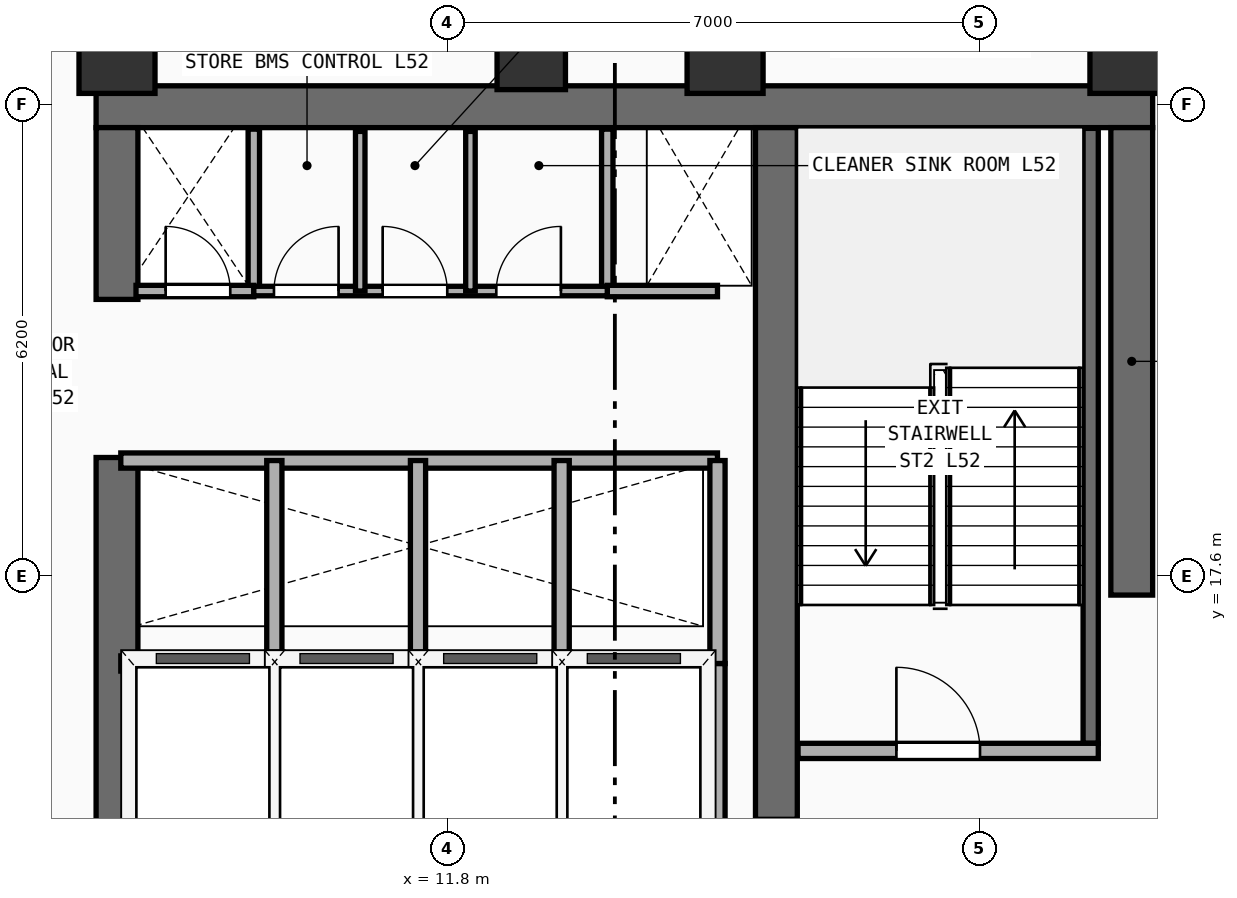
"""IFC4 building model, lengths in metres.
Left out: names, types, materials, properties, quantities, classifications, styles, units other than length and angle.
Written with IfcOpenShell. Run it as: python <this file> out.ifc"""

import sys

from ifc_helpers import new_model, si_unit, direction, frame, frame_2d, origin, origin_2d, place, context, subcontext, project, spatial, rectangle, extrude, element, fill, save


model = new_model("IFC4")
c1 = context("Model", 3, precision=1e-05, world=origin(), true_north=direction((0.0, 1.0)))
c2 = subcontext(c1, "Body", "Model", "MODEL_VIEW")
j1 = project(units=[si_unit("LENGTHUNIT", "METRE"), si_unit("PLANEANGLEUNIT", "RADIAN")], contexts=[c1])
p1 = place(None, origin())
s1 = spatial("IfcSite", under=j1, at=p1, CompositionType="ELEMENT")
p2 = place(p1, origin())
s2 = spatial("IfcBuilding", under=s1, at=p2, CompositionType="ELEMENT")
p3 = place(p2, frame((0.0, 0.0, 204.5)))
s3 = spatial("IfcBuildingStorey", under=s2, at=p3, CompositionType="ELEMENT", Elevation=204.5)
p4 = place(p3, frame((7.175, 23.775, 0.0), z_axis=(0.0, 0.0, 1.0), x_axis=(1.0, 0.0, 0.0)))
e1 = element("IfcWall", 1, at=p4, inside=s3, PredefinedType="SHEAR", context=c2, shape_type="SweptSolid", body=[
    extrude(rectangle(XDim=13.9, YDim=0.55, at=frame_2d((6.95, 0.0))), origin(), (0.0, 0.0, 1.0), 3.56),
])
p5 = place(p3, frame((7.45, 14.35, 0.0), z_axis=(0.0, 0.0, 1.0), x_axis=(0.0, 1.0, 0.0)))
e2 = element("IfcWall", 2, at=p5, inside=s3, PredefinedType="SHEAR", context=c2, shape_type="SweptSolid", body=[
    extrude(rectangle(XDim=4.81, YDim=0.55, at=frame_2d((2.405, 0.0))), origin(), (0.0, 0.0, 1.0), 3.56),
])
p6 = place(p3, frame((7.45, 21.24, 0.0), z_axis=(0.0, 0.0, 1.0), x_axis=(0.0, 1.0, 0.0)))
e3 = element("IfcWall", 3, at=p6, inside=s3, PredefinedType="SHEAR", context=c2, shape_type="SweptSolid", body=[
    extrude(rectangle(XDim=2.26, YDim=0.55, at=frame_2d((1.13, 0.0))), origin(), (0.0, 0.0, 1.0), 3.56),
])
p7 = place(p3, frame((20.8, 17.35, 0.0), z_axis=(0.0, 0.0, 1.0), x_axis=(0.0, 1.0, 0.0)))
e4 = element("IfcWall", 4, at=p7, inside=s3, PredefinedType="SHEAR", context=c2, shape_type="SweptSolid", body=[
    extrude(rectangle(XDim=6.15, YDim=0.55, at=frame_2d((3.075, 0.0))), origin(), (0.0, 0.0, 1.0), 3.56),
])
p8 = place(p3, frame((16.125, 14.4, 0.0), z_axis=(0.0, 0.0, 1.0), x_axis=(0.0, 1.0, 0.0)))
e5 = element("IfcWall", 5, at=p8, inside=s3, PredefinedType="SHEAR", context=c2, shape_type="SweptSolid", body=[
    extrude(rectangle(XDim=9.1, YDim=0.55, at=frame_2d((4.55, 0.0))), origin(), (0.0, 0.0, 1.0), 3.56),
])
for number, where, z_axis, x_axis in (
    (6, (7.45, 24.45, 0.0), (0.0, 0.0, 1.0), (1.0, 0.0, 0.0)),
    (7, (15.45, 24.45, 0.0), (0.0, 0.0, 1.0), (1.0, 0.0, 0.0)),
    (8, (20.75, 24.45, 0.0), (0.0, 0.0, 1.0), (1.0, 0.0, 0.0)),
):
    element("IfcColumn", number, at=place(p3, frame(where, z_axis=z_axis, x_axis=x_axis)), inside=s3, PredefinedType="COLUMN", context=c2, shape_type="SweptSolid", body=[
        extrude(rectangle(XDim=1.0, YDim=1.0, at=origin_2d()), origin(), (0.0, 0.0, 1.0), 3.56),
    ])
p9 = place(p3, frame((12.9, 24.45, 0.0), z_axis=(0.0, 0.0, 1.0), x_axis=(1.0, 0.0, 0.0)))
e9 = element("IfcColumn", 9, at=p9, inside=s3, PredefinedType="COLUMN", context=c2, shape_type="SweptSolid", body=[
    extrude(rectangle(XDim=0.9, YDim=0.9, at=origin_2d()), origin(), (0.0, 0.0, 1.0), 3.56),
])
p10 = place(p3, frame((27.685, 19.775, 0.0), z_axis=(0.0, 0.0, 1.0), x_axis=(-0.707106781187, 0.707106781187, 0.0)))
e10 = element("IfcWall", 10, at=p10, inside=s3, PredefinedType="SOLIDWALL", context=c2, shape_type="SweptSolid", body=[
    extrude(rectangle(XDim=9.207, YDim=0.28, at=frame_2d((4.603, 0.0))), origin(), (0.0, 0.0, 1.0), 3.56),
])
p11 = place(p3, frame((20.26, 15.4, 0.0), z_axis=(0.0, 0.0, 1.0), x_axis=(0.0, 1.0, 0.0)))
e11 = element("IfcWall", 11, at=p11, inside=s3, PredefinedType="SHEAR", context=c2, shape_type="SweptSolid", body=[
    extrude(rectangle(XDim=8.09, YDim=0.2, at=frame_2d((4.045, 0.0))), origin(), (0.0, 0.0, 1.0), 3.56),
])
p12 = place(p3, frame((16.41, 15.3, 0.0), z_axis=(0.0, 0.0, 1.0), x_axis=(1.0, 0.0, 0.0)))
e12 = element("IfcWall", 12, at=p12, inside=s3, PredefinedType="PARTITIONING", context=c2, shape_type="SweptSolid", body=[
    extrude(rectangle(XDim=3.95, YDim=0.2, at=frame_2d((1.975, 0.0))), origin(), (0.0, 0.0, 1.0), 3.56),
])
p13 = place(p12, frame((1.294, 0.0, 0.0)))
e13 = element("IfcOpeningElement", 13, at=p13, cuts=e12, PredefinedType="OPENING", context=c2, shape_type="SweptSolid", body=[
    extrude(rectangle(XDim=1.1, YDim=2.2, at=frame_2d((0.55, 1.1))), frame((0.0, 0.11, 0.0), z_axis=(0.0, -1.0, 0.0), x_axis=(1.0, 0.0, 0.0)), (0.0, 0.0, 1.0), 0.22),
])
p14 = place(p3, frame((7.5, 16.45, 0.0), z_axis=(0.0, 0.0, 1.0), x_axis=(1.0, 0.0, 0.0)))
e14 = element("IfcWall", 14, at=p14, inside=s3, PredefinedType="PARTITIONING", context=c2, shape_type="SweptSolid", body=[
    extrude(rectangle(XDim=7.85, YDim=0.2, at=frame_2d((3.925, 0.0))), origin(), (0.0, 0.0, 1.0), 3.56),
])
for number, where, z_axis, x_axis in (
    (15, (15.35, 14.22, 0.0), (0.0, 0.0, 1.0), (0.0, 1.0, 0.0)),
    (16, (9.52, 14.22, 0.0), (0.0, 0.0, 1.0), (0.0, 1.0, 0.0)),
    (17, (11.41, 14.22, 0.0), (0.0, 0.0, 1.0), (0.0, 1.0, 0.0)),
    (18, (13.3, 14.22, 0.0), (0.0, 0.0, 1.0), (0.0, 1.0, 0.0)),
):
    element("IfcWall", number, at=place(p3, frame(where, z_axis=z_axis, x_axis=x_axis)), inside=s3, PredefinedType="PARTITIONING", context=c2, shape_type="SweptSolid", body=[
        extrude(rectangle(XDim=2.23, YDim=0.2, at=frame_2d((1.115, 0.0))), origin(), (0.0, 0.0, 1.0), 3.56),
    ])
p15 = place(p3, frame((7.5, 19.12, 0.0), z_axis=(0.0, 0.0, 1.0), x_axis=(1.0, 0.0, 0.0)))
e19 = element("IfcWall", 19, at=p15, inside=s3, PredefinedType="PARTITIONING", context=c2, shape_type="SweptSolid", body=[
    extrude(rectangle(XDim=7.85, YDim=0.2, at=frame_2d((3.925, 0.0))), origin(), (0.0, 0.0, 1.0), 3.56),
])
for number, where, z_axis, x_axis in (
    (20, (15.35, 16.45, 0.0), (0.0, 0.0, 1.0), (0.0, 1.0, 0.0)),
    (21, (9.52, 16.45, 0.0), (0.0, 0.0, 1.0), (0.0, 1.0, 0.0)),
    (22, (11.41, 16.45, 0.0), (0.0, 0.0, 1.0), (0.0, 1.0, 0.0)),
    (23, (13.3, 16.45, 0.0), (0.0, 0.0, 1.0), (0.0, 1.0, 0.0)),
):
    element("IfcWall", number, at=place(p3, frame(where, z_axis=z_axis, x_axis=x_axis)), inside=s3, PredefinedType="PARTITIONING", context=c2, shape_type="SweptSolid", body=[
        extrude(rectangle(XDim=2.67, YDim=0.2, at=frame_2d((1.335, 0.0))), origin(), (0.0, 0.0, 1.0), 3.56),
    ])
for number, where, z_axis, x_axis in (
    (24, (9.25, 21.35, 0.0), (0.0, 0.0, 1.0), (0.0, 1.0, 0.0)),
    (25, (13.9, 21.35, 0.0), (0.0, 0.0, 1.0), (0.0, 1.0, 0.0)),
):
    element("IfcWall", number, at=place(p3, frame(where, z_axis=z_axis, x_axis=x_axis)), inside=s3, PredefinedType="PARTITIONING", context=c2, shape_type="SweptSolid", body=[
        extrude(rectangle(XDim=2.13, YDim=0.15, at=frame_2d((1.065, 0.0))), origin(), (0.0, 0.0, 1.0), 3.56),
    ])
p16 = place(p3, frame((7.7, 21.35, 0.0), z_axis=(0.0, 0.0, 1.0), x_axis=(1.0, 0.0, 0.0)))
e26 = element("IfcWall", 26, at=p16, inside=s3, PredefinedType="PARTITIONING", context=c2, shape_type="SweptSolid", body=[
    extrude(rectangle(XDim=1.55, YDim=0.15, at=frame_2d((0.775, 0.0))), origin(), (0.0, 0.0, 1.0), 3.56),
])
p17 = place(p16, frame((0.39, 0.0, 0.0)))
e27 = element("IfcOpeningElement", 27, at=p17, cuts=e26, PredefinedType="OPENING", context=c2, shape_type="SweptSolid", body=[
    extrude(rectangle(XDim=0.85, YDim=2.15, at=frame_2d((0.425, 1.075))), frame((0.0, 0.085, 0.0), z_axis=(0.0, -1.0, 0.0), x_axis=(1.0, 0.0, 0.0)), (0.0, 0.0, 1.0), 0.17),
])
p18 = place(p3, frame((13.9, 21.35, 0.0), z_axis=(0.0, 0.0, 1.0), x_axis=(1.0, 0.0, 0.0)))
e28 = element("IfcWall", 28, at=p18, inside=s3, PredefinedType="PARTITIONING", context=c2, shape_type="SweptSolid", body=[
    extrude(rectangle(XDim=1.45, YDim=0.15, at=frame_2d((0.725, 0.0))), origin(), (0.0, 0.0, 1.0), 3.56),
])
p19 = place(p3, frame((9.25, 21.35, 0.0), z_axis=(0.0, 0.0, 1.0), x_axis=(1.0, 0.0, 0.0)))
e29 = element("IfcWall", 29, at=p19, inside=s3, PredefinedType="PARTITIONING", context=c2, shape_type="SweptSolid", body=[
    extrude(rectangle(XDim=4.65, YDim=0.125, at=frame_2d((2.325, 0.0))), origin(), (0.0, 0.0, 1.0), 3.56),
])
p20 = place(p19, frame((0.265, 0.0, 0.0)))
e30 = element("IfcOpeningElement", 30, at=p20, cuts=e29, PredefinedType="OPENING", context=c2, shape_type="SweptSolid", body=[
    extrude(rectangle(XDim=0.85, YDim=2.15, at=frame_2d((0.425, 1.075))), frame((0.0, 0.073, 0.0), z_axis=(0.0, -1.0, 0.0), x_axis=(1.0, 0.0, 0.0)), (0.0, 0.0, 1.0), 0.145),
])
p21 = place(p19, frame((1.695, 0.0, 0.0)))
e31 = element("IfcOpeningElement", 31, at=p21, cuts=e29, PredefinedType="OPENING", context=c2, shape_type="SweptSolid", body=[
    extrude(rectangle(XDim=0.85, YDim=2.15, at=frame_2d((0.425, 1.075))), frame((0.0, 0.073, 0.0), z_axis=(0.0, -1.0, 0.0), x_axis=(1.0, 0.0, 0.0)), (0.0, 0.0, 1.0), 0.145),
])
p22 = place(p19, frame((3.19, 0.0, 0.0)))
e32 = element("IfcOpeningElement", 32, at=p22, cuts=e29, PredefinedType="OPENING", context=c2, shape_type="SweptSolid", body=[
    extrude(rectangle(XDim=0.85, YDim=2.15, at=frame_2d((0.425, 1.075))), frame((0.0, 0.073, 0.0), z_axis=(0.0, -1.0, 0.0), x_axis=(1.0, 0.0, 0.0)), (0.0, 0.0, 1.0), 0.145),
])
for number, where, z_axis, x_axis in (
    (33, (10.65, 21.35, 0.0), (0.0, 0.0, 1.0), (0.0, 1.0, 0.0)),
    (34, (12.1, 21.35, 0.0), (0.0, 0.0, 1.0), (0.0, 1.0, 0.0)),
):
    element("IfcWall", number, at=place(p3, frame(where, z_axis=z_axis, x_axis=x_axis)), inside=s3, PredefinedType="PARTITIONING", context=c2, shape_type="SweptSolid", body=[
        extrude(rectangle(XDim=2.1, YDim=0.125, at=frame_2d((1.05, 0.0))), origin(), (0.0, 0.0, 1.0), 3.56),
    ])
p23 = place(p13, origin())
e35 = element("IfcDoor", 35, at=p23, inside=s3, OperationType="SINGLE_SWING_LEFT", PredefinedType="DOOR", context=c2, shape_type="SweptSolid", body=[
    extrude(rectangle(XDim=1.1, YDim=2.2, at=frame_2d((0.55, 1.1))), frame((0.0, 0.025, 0.0), z_axis=(0.0, -1.0, 0.0), x_axis=(1.0, 0.0, 0.0)), (0.0, 0.0, 1.0), 0.05),
])
fill(e13, e35)
p24 = place(p17, origin())
e36 = element("IfcDoor", 36, at=p24, inside=s3, OperationType="SINGLE_SWING_LEFT", PredefinedType="DOOR", context=c2, shape_type="SweptSolid", body=[
    extrude(rectangle(XDim=0.85, YDim=2.15, at=frame_2d((0.425, 1.075))), frame((0.0, 0.025, 0.0), z_axis=(0.0, -1.0, 0.0), x_axis=(1.0, 0.0, 0.0)), (0.0, 0.0, 1.0), 0.05),
])
fill(e27, e36)
p25 = place(p20, origin())
e37 = element("IfcDoor", 37, at=p25, inside=s3, OperationType="SINGLE_SWING_RIGHT", PredefinedType="DOOR", context=c2, shape_type="SweptSolid", body=[
    extrude(rectangle(XDim=0.85, YDim=2.15, at=frame_2d((0.425, 1.075))), frame((0.0, 0.025, 0.0), z_axis=(0.0, -1.0, 0.0), x_axis=(1.0, 0.0, 0.0)), (0.0, 0.0, 1.0), 0.05),
])
fill(e30, e37)
p26 = place(p21, origin())
e38 = element("IfcDoor", 38, at=p26, inside=s3, OperationType="SINGLE_SWING_LEFT", PredefinedType="DOOR", context=c2, shape_type="SweptSolid", body=[
    extrude(rectangle(XDim=0.85, YDim=2.15, at=frame_2d((0.425, 1.075))), frame((0.0, 0.025, 0.0), z_axis=(0.0, -1.0, 0.0), x_axis=(1.0, 0.0, 0.0)), (0.0, 0.0, 1.0), 0.05),
])
fill(e31, e38)
p27 = place(p22, origin())
e39 = element("IfcDoor", 39, at=p27, inside=s3, OperationType="SINGLE_SWING_RIGHT", PredefinedType="DOOR", context=c2, shape_type="SweptSolid", body=[
    extrude(rectangle(XDim=0.85, YDim=2.15, at=frame_2d((0.425, 1.075))), frame((0.0, 0.025, 0.0), z_axis=(0.0, -1.0, 0.0), x_axis=(1.0, 0.0, 0.0)), (0.0, 0.0, 1.0), 0.05),
])
fill(e32, e39)
save(model, sys.argv[1])
